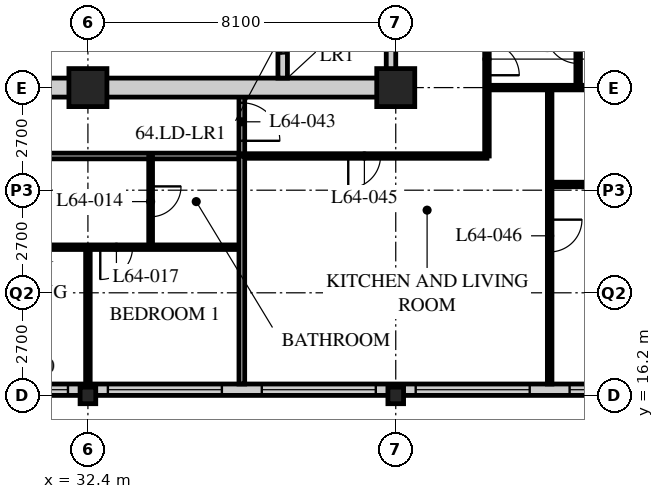
"""IFC4 building model, lengths in metres.
Left out: names, types, materials, properties, quantities, classifications, styles, units other than length and angle.
Written with IfcOpenShell. Run it as: python <this file> out.ifc"""

import sys

from ifc_helpers import new_model, si_unit, direction, frame, frame_2d, origin, origin_2d, place, context, subcontext, project, spatial, rectangle, hollow_rectangle, i_section, extrude, element, fill, save


model = new_model("IFC4")
c1 = context("Model", 3, precision=1e-05, world=origin(), true_north=direction((0.0, 1.0)))
c2 = subcontext(c1, "Body", "Model", "MODEL_VIEW")
j1 = project(units=[si_unit("LENGTHUNIT", "METRE"), si_unit("PLANEANGLEUNIT", "RADIAN")], contexts=[c1])
p1 = place(None, origin())
s1 = spatial("IfcSite", under=j1, at=p1, CompositionType="ELEMENT")
p2 = place(p1, origin())
s2 = spatial("IfcBuilding", under=s1, at=p2, CompositionType="ELEMENT")
p3 = place(p2, frame((0.0, 0.0, 250.2)))
s3 = spatial("IfcBuildingStorey", under=s2, at=p3, CompositionType="ELEMENT", Elevation=250.2)
p4 = place(p3, frame((32.4, 16.2, 0.0), z_axis=(0.0, 0.0, 1.0), x_axis=(1.0, 0.0, 0.0)))
e1 = element("IfcColumn", 1, at=p4, inside=s3, PredefinedType="COLUMN", context=c2, shape_type="SweptSolid", body=[
    extrude(i_section(OverallWidth=0.412, OverallDepth=0.437, WebThickness=0.036, FlangeThickness=0.058, FilletRadius=0.015, at=origin_2d()), origin(), (0.0, 0.0, 1.0), 3.9),
])
p5 = place(p3, frame((32.4, 24.3, 0.0), z_axis=(0.0, 0.0, 1.0), x_axis=(1.0, 0.0, 0.0)))
e2 = element("IfcColumn", 2, at=p5, inside=s3, PredefinedType="COLUMN", context=c2, shape_type="SweptSolid", body=[
    extrude(hollow_rectangle(XDim=1.0, YDim=1.0, WallThickness=0.1, at=origin_2d()), origin(), (0.0, 0.0, 1.0), 3.9),
])
p6 = place(p3, frame((40.5, 16.2, 0.0), z_axis=(0.0, 0.0, 1.0), x_axis=(1.0, 0.0, 0.0)))
e3 = element("IfcColumn", 3, at=p6, inside=s3, PredefinedType="COLUMN", context=c2, shape_type="SweptSolid", body=[
    extrude(i_section(OverallWidth=0.412, OverallDepth=0.437, WebThickness=0.036, FlangeThickness=0.058, FilletRadius=0.015, at=origin_2d()), origin(), (0.0, 0.0, 1.0), 3.9),
])
p7 = place(p3, frame((40.5, 24.3, 0.0), z_axis=(0.0, 0.0, 1.0), x_axis=(1.0, 0.0, 0.0)))
e4 = element("IfcColumn", 4, at=p7, inside=s3, PredefinedType="COLUMN", context=c2, shape_type="SweptSolid", body=[
    extrude(hollow_rectangle(XDim=1.0, YDim=1.0, WallThickness=0.1, at=origin_2d()), origin(), (0.0, 0.0, 1.0), 3.9),
])
p8 = place(p3, frame((8.4, 16.35, 0.0), z_axis=(0.0, 0.0, 1.0), x_axis=(1.0, 0.0, 0.0)))
e5 = element("IfcWall", 5, at=p8, inside=s3, PredefinedType="SOLIDWALL", context=c2, shape_type="SweptSolid", body=[
    extrude(rectangle(XDim=40.2, YDim=0.3, at=frame_2d((20.1, 0.0))), origin(), (0.0, 0.0, 1.0), 3.69),
])
p9 = place(p8, frame((0.225, 0.0, 0.6)))
e6 = element("IfcOpeningElement", 6, at=p9, cuts=e5, PredefinedType="OPENING", context=c2, shape_type="SweptSolid", body=[
    extrude(rectangle(XDim=3.0, YDim=2.4, at=frame_2d((1.5, 1.2))), frame((0.0, 0.16, 0.0), z_axis=(0.0, -1.0, 0.0), x_axis=(1.0, 0.0, 0.0)), (0.0, 0.0, 1.0), 0.32),
])
p10 = place(p8, frame((4.275, 0.0, 0.6)))
e7 = element("IfcOpeningElement", 7, at=p10, cuts=e5, PredefinedType="OPENING", context=c2, shape_type="SweptSolid", body=[
    extrude(rectangle(XDim=3.0, YDim=2.4, at=frame_2d((1.5, 1.2))), frame((0.0, 0.16, 0.0), z_axis=(0.0, -1.0, 0.0), x_axis=(1.0, 0.0, 0.0)), (0.0, 0.0, 1.0), 0.32),
])
p11 = place(p8, frame((8.325, 0.0, 0.6)))
e8 = element("IfcOpeningElement", 8, at=p11, cuts=e5, PredefinedType="OPENING", context=c2, shape_type="SweptSolid", body=[
    extrude(rectangle(XDim=3.0, YDim=2.4, at=frame_2d((1.5, 1.2))), frame((0.0, 0.16, 0.0), z_axis=(0.0, -1.0, 0.0), x_axis=(1.0, 0.0, 0.0)), (0.0, 0.0, 1.0), 0.32),
])
p12 = place(p8, frame((12.375, 0.0, 0.6)))
e9 = element("IfcOpeningElement", 9, at=p12, cuts=e5, PredefinedType="OPENING", context=c2, shape_type="SweptSolid", body=[
    extrude(rectangle(XDim=3.0, YDim=2.4, at=frame_2d((1.5, 1.2))), frame((0.0, 0.16, 0.0), z_axis=(0.0, -1.0, 0.0), x_axis=(1.0, 0.0, 0.0)), (0.0, 0.0, 1.0), 0.32),
])
p13 = place(p8, frame((16.425, 0.0, 0.6)))
e10 = element("IfcOpeningElement", 10, at=p13, cuts=e5, PredefinedType="OPENING", context=c2, shape_type="SweptSolid", body=[
    extrude(rectangle(XDim=3.0, YDim=2.4, at=frame_2d((1.5, 1.2))), frame((0.0, 0.16, 0.0), z_axis=(0.0, -1.0, 0.0), x_axis=(1.0, 0.0, 0.0)), (0.0, 0.0, 1.0), 0.32),
])
p14 = place(p8, frame((20.475, 0.0, 0.6)))
e11 = element("IfcOpeningElement", 11, at=p14, cuts=e5, PredefinedType="OPENING", context=c2, shape_type="SweptSolid", body=[
    extrude(rectangle(XDim=3.0, YDim=2.4, at=frame_2d((1.5, 1.2))), frame((0.0, 0.16, 0.0), z_axis=(0.0, -1.0, 0.0), x_axis=(1.0, 0.0, 0.0)), (0.0, 0.0, 1.0), 0.32),
])
p15 = place(p8, frame((24.525, 0.0, 0.6)))
e12 = element("IfcOpeningElement", 12, at=p15, cuts=e5, PredefinedType="OPENING", context=c2, shape_type="SweptSolid", body=[
    extrude(rectangle(XDim=3.0, YDim=2.4, at=frame_2d((1.5, 1.2))), frame((0.0, 0.16, 0.0), z_axis=(0.0, -1.0, 0.0), x_axis=(1.0, 0.0, 0.0)), (0.0, 0.0, 1.0), 0.32),
])
p16 = place(p8, frame((28.575, 0.0, 0.6)))
e13 = element("IfcOpeningElement", 13, at=p16, cuts=e5, PredefinedType="OPENING", context=c2, shape_type="SweptSolid", body=[
    extrude(rectangle(XDim=3.0, YDim=2.4, at=frame_2d((1.5, 1.2))), frame((0.0, 0.16, 0.0), z_axis=(0.0, -1.0, 0.0), x_axis=(1.0, 0.0, 0.0)), (0.0, 0.0, 1.0), 0.32),
])
p17 = place(p8, frame((32.625, 0.0, 0.6)))
e14 = element("IfcOpeningElement", 14, at=p17, cuts=e5, PredefinedType="OPENING", context=c2, shape_type="SweptSolid", body=[
    extrude(rectangle(XDim=3.0, YDim=2.4, at=frame_2d((1.5, 1.2))), frame((0.0, 0.16, 0.0), z_axis=(0.0, -1.0, 0.0), x_axis=(1.0, 0.0, 0.0)), (0.0, 0.0, 1.0), 0.32),
])
p18 = place(p8, frame((36.675, 0.0, 0.6)))
e15 = element("IfcOpeningElement", 15, at=p18, cuts=e5, PredefinedType="OPENING", context=c2, shape_type="SweptSolid", body=[
    extrude(rectangle(XDim=3.0, YDim=2.4, at=frame_2d((1.5, 1.2))), frame((0.0, 0.16, 0.0), z_axis=(0.0, -1.0, 0.0), x_axis=(1.0, 0.0, 0.0)), (0.0, 0.0, 1.0), 0.32),
])
p19 = place(p3, frame((12.15, 22.5, 0.0), z_axis=(0.0, 0.0, 1.0), x_axis=(1.0, 0.0, 0.0)))
e16 = element("IfcWall", 16, at=p19, inside=s3, PredefinedType="PARTITIONING", context=c2, shape_type="SweptSolid", body=[
    extrude(rectangle(XDim=24.3, YDim=0.15, at=frame_2d((12.15, 0.0))), origin(), (0.0, 0.0, 1.0), 3.69),
])
p20 = place(p19, frame((6.4, 0.0, 0.0)))
e17 = element("IfcOpeningElement", 17, at=p20, cuts=e16, PredefinedType="OPENING", context=c2, shape_type="SweptSolid", body=[
    extrude(rectangle(XDim=1.0, YDim=2.1, at=frame_2d((0.5, 1.05))), frame((0.0, 0.085, 0.0), z_axis=(0.0, -1.0, 0.0), x_axis=(1.0, 0.0, 0.0)), (0.0, 0.0, 1.0), 0.17),
])
p21 = place(p19, frame((8.5, 0.0, 0.0)))
e18 = element("IfcOpeningElement", 18, at=p21, cuts=e16, PredefinedType="OPENING", context=c2, shape_type="SweptSolid", body=[
    extrude(rectangle(XDim=1.0, YDim=2.1, at=frame_2d((0.5, 1.05))), frame((0.0, 0.085, 0.0), z_axis=(0.0, -1.0, 0.0), x_axis=(1.0, 0.0, 0.0)), (0.0, 0.0, 1.0), 0.17),
])
p22 = place(p19, frame((16.6, 0.0, 0.0)))
e19 = element("IfcOpeningElement", 19, at=p22, cuts=e16, PredefinedType="OPENING", context=c2, shape_type="SweptSolid", body=[
    extrude(rectangle(XDim=1.0, YDim=2.1, at=frame_2d((0.5, 1.05))), frame((0.0, 0.085, 0.0), z_axis=(0.0, -1.0, 0.0), x_axis=(1.0, 0.0, 0.0)), (0.0, 0.0, 1.0), 0.17),
])
p23 = place(p19, frame((2.625, 0.0, 0.0)))
e20 = element("IfcOpeningElement", 20, at=p23, cuts=e16, PredefinedType="OPENING", context=c2, shape_type="SweptSolid", body=[
    extrude(rectangle(XDim=1.0, YDim=2.1, at=frame_2d((0.5, 1.05))), frame((0.0, 0.085, 0.0), z_axis=(0.0, -1.0, 0.0), x_axis=(1.0, 0.0, 0.0)), (0.0, 0.0, 1.0), 0.17),
])
p24 = place(p3, frame((36.45, 22.5, 0.0), z_axis=(0.0, 0.0, 1.0), x_axis=(0.0, 1.0, 0.0)))
e21 = element("IfcWall", 21, at=p24, inside=s3, PredefinedType="PARTITIONING", context=c2, shape_type="SweptSolid", body=[
    extrude(rectangle(XDim=1.8, YDim=0.15, at=frame_2d((0.9, 0.0))), origin(), (0.0, 0.0, 1.0), 3.69),
])
p25 = place(p24, frame((0.4, 0.0, 0.0)))
e22 = element("IfcOpeningElement", 22, at=p25, cuts=e21, PredefinedType="OPENING", context=c2, shape_type="SweptSolid", body=[
    extrude(rectangle(XDim=1.0, YDim=2.1, at=frame_2d((0.5, 1.05))), frame((0.0, 0.085, 0.0), z_axis=(0.0, -1.0, 0.0), x_axis=(1.0, 0.0, 0.0)), (0.0, 0.0, 1.0), 0.17),
])
p26 = place(p3, frame((20.25, 20.1, 0.0), z_axis=(0.0, 0.0, 1.0), x_axis=(1.0, 0.0, 0.0)))
e23 = element("IfcWall", 23, at=p26, inside=s3, PredefinedType="PARTITIONING", context=c2, shape_type="SweptSolid", body=[
    extrude(rectangle(XDim=16.2, YDim=0.12, at=frame_2d((8.1, 0.0))), origin(), (0.0, 0.0, 1.0), 3.69),
])
p27 = place(p26, frame((0.975, 0.0, 0.0)))
e24 = element("IfcOpeningElement", 24, at=p27, cuts=e23, PredefinedType="OPENING", context=c2, shape_type="SweptSolid", body=[
    extrude(rectangle(XDim=0.85, YDim=2.1, at=frame_2d((0.425, 1.05))), frame((0.0, 0.07, 0.0), z_axis=(0.0, -1.0, 0.0), x_axis=(1.0, 0.0, 0.0)), (0.0, 0.0, 1.0), 0.14),
])
p28 = place(p26, frame((4.375, 0.0, 0.0)))
e25 = element("IfcOpeningElement", 25, at=p28, cuts=e23, PredefinedType="OPENING", context=c2, shape_type="SweptSolid", body=[
    extrude(rectangle(XDim=0.85, YDim=2.1, at=frame_2d((0.425, 1.05))), frame((0.0, 0.07, 0.0), z_axis=(0.0, -1.0, 0.0), x_axis=(1.0, 0.0, 0.0)), (0.0, 0.0, 1.0), 0.14),
])
p29 = place(p26, frame((9.075, 0.0, 0.0)))
e26 = element("IfcOpeningElement", 26, at=p29, cuts=e23, PredefinedType="OPENING", context=c2, shape_type="SweptSolid", body=[
    extrude(rectangle(XDim=0.85, YDim=2.1, at=frame_2d((0.425, 1.05))), frame((0.0, 0.07, 0.0), z_axis=(0.0, -1.0, 0.0), x_axis=(1.0, 0.0, 0.0)), (0.0, 0.0, 1.0), 0.14),
])
p30 = place(p26, frame((12.475, 0.0, 0.0)))
e27 = element("IfcOpeningElement", 27, at=p30, cuts=e23, PredefinedType="OPENING", context=c2, shape_type="SweptSolid", body=[
    extrude(rectangle(XDim=0.85, YDim=2.1, at=frame_2d((0.425, 1.05))), frame((0.0, 0.07, 0.0), z_axis=(0.0, -1.0, 0.0), x_axis=(1.0, 0.0, 0.0)), (0.0, 0.0, 1.0), 0.14),
])
p31 = place(p3, frame((34.05, 22.5, 0.0), z_axis=(0.0, 0.0, 1.0), x_axis=(0.0, -1.0, 0.0)))
e28 = element("IfcWall", 28, at=p31, inside=s3, PredefinedType="PARTITIONING", context=c2, shape_type="SweptSolid", body=[
    extrude(rectangle(XDim=2.4, YDim=0.1, at=frame_2d((1.2, 0.0))), origin(), (0.0, 0.0, 1.0), 3.69),
])
p32 = place(p31, frame((0.8, 0.0, 0.0)))
e29 = element("IfcOpeningElement", 29, at=p32, cuts=e28, PredefinedType="OPENING", context=c2, shape_type="SweptSolid", body=[
    extrude(rectangle(XDim=0.8, YDim=2.1, at=frame_2d((0.4, 1.05))), frame((0.0, 0.06, 0.0), z_axis=(0.0, -1.0, 0.0), x_axis=(1.0, 0.0, 0.0)), (0.0, 0.0, 1.0), 0.12),
])
p33 = place(p3, frame((32.4, 20.1, 0.0), z_axis=(0.0, 0.0, 1.0), x_axis=(0.0, -1.0, 0.0)))
e30 = element("IfcWall", 30, at=p33, inside=s3, PredefinedType="PARTITIONING", context=c2, shape_type="SweptSolid", body=[
    extrude(rectangle(XDim=3.6, YDim=0.12, at=frame_2d((1.8, 0.0))), origin(), (0.0, 0.0, 1.0), 3.078),
])
p34 = place(p3, frame((42.9, 22.5, 0.0), z_axis=(0.0, 0.0, 1.0), x_axis=(0.0, 1.0, 0.0)))
e31 = element("IfcWall", 31, at=p34, inside=s3, PredefinedType="PARTITIONING", context=c2, shape_type="SweptSolid", body=[
    extrude(rectangle(XDim=13.95, YDim=0.12, at=frame_2d((6.975, 0.0))), origin(), (0.0, 0.0, 1.0), 3.69),
])
p35 = place(p34, frame((2.125, 0.0, 0.0)))
e32 = element("IfcOpeningElement", 32, at=p35, cuts=e31, PredefinedType="OPENING", context=c2, shape_type="SweptSolid", body=[
    extrude(rectangle(XDim=0.85, YDim=2.1, at=frame_2d((0.425, 1.05))), frame((0.0, 0.07, 0.0), z_axis=(0.0, -1.0, 0.0), x_axis=(1.0, 0.0, 0.0)), (0.0, 0.0, 1.0), 0.14),
])
p36 = place(p34, frame((6.175, 0.0, 0.0)))
e33 = element("IfcOpeningElement", 33, at=p36, cuts=e31, PredefinedType="OPENING", context=c2, shape_type="SweptSolid", body=[
    extrude(rectangle(XDim=0.85, YDim=2.1, at=frame_2d((0.425, 1.05))), frame((0.0, 0.07, 0.0), z_axis=(0.0, -1.0, 0.0), x_axis=(1.0, 0.0, 0.0)), (0.0, 0.0, 1.0), 0.14),
])
p37 = place(p34, frame((10.225, 0.0, 0.0)))
e34 = element("IfcOpeningElement", 34, at=p37, cuts=e31, PredefinedType="OPENING", context=c2, shape_type="SweptSolid", body=[
    extrude(rectangle(XDim=0.85, YDim=2.1, at=frame_2d((0.425, 1.05))), frame((0.0, 0.07, 0.0), z_axis=(0.0, -1.0, 0.0), x_axis=(1.0, 0.0, 0.0)), (0.0, 0.0, 1.0), 0.14),
])
p38 = place(p3, frame((36.45, 22.5, 0.0), z_axis=(0.0, 0.0, 1.0), x_axis=(1.0, 0.0, 0.0)))
e35 = element("IfcWall", 35, at=p38, inside=s3, PredefinedType="PARTITIONING", context=c2, shape_type="SweptSolid", body=[
    extrude(rectangle(XDim=6.45, YDim=0.12, at=frame_2d((3.225, 0.0))), origin(), (0.0, 0.0, 1.0), 3.69),
])
p39 = place(p38, frame((2.8, 0.0, 0.0)))
e36 = element("IfcOpeningElement", 36, at=p39, cuts=e35, PredefinedType="OPENING", context=c2, shape_type="SweptSolid", body=[
    extrude(rectangle(XDim=0.85, YDim=2.1, at=frame_2d((0.425, 1.05))), frame((0.0, 0.07, 0.0), z_axis=(0.0, -1.0, 0.0), x_axis=(1.0, 0.0, 0.0)), (0.0, 0.0, 1.0), 0.14),
])
p40 = place(p3, frame((42.9, 24.3, 0.0), z_axis=(0.0, 0.0, 1.0), x_axis=(1.0, 0.0, 0.0)))
e37 = element("IfcWall", 37, at=p40, inside=s3, PredefinedType="PARTITIONING", context=c2, shape_type="SweptSolid", body=[
    extrude(rectangle(XDim=9.45, YDim=0.12, at=frame_2d((4.725, 0.0))), origin(), (0.0, 0.0, 1.0), 3.078),
])
p41 = place(p3, frame((36.45, 16.5, 0.0), z_axis=(0.0, 0.0, 1.0), x_axis=(0.0, 1.0, 0.0)))
e38 = element("IfcWall", 38, at=p41, inside=s3, PredefinedType="PARTITIONING", context=c2, shape_type="SweptSolid", body=[
    extrude(rectangle(XDim=6.0, YDim=0.15, at=frame_2d((3.0, 0.0))), origin(), (0.0, 0.0, 1.0), 3.69),
])
p42 = place(p3, frame((44.55, 16.5, 0.0), z_axis=(0.0, 0.0, 1.0), x_axis=(0.0, 1.0, 0.0)))
e39 = element("IfcWall", 39, at=p42, inside=s3, PredefinedType="PARTITIONING", context=c2, shape_type="SweptSolid", body=[
    extrude(rectangle(XDim=7.8, YDim=0.12, at=frame_2d((3.9, 0.0))), origin(), (0.0, 0.0, 1.0), 3.69),
])
p43 = place(p42, frame((3.475, 0.0, 0.0)))
e40 = element("IfcOpeningElement", 40, at=p43, cuts=e39, PredefinedType="OPENING", context=c2, shape_type="SweptSolid", body=[
    extrude(rectangle(XDim=0.85, YDim=2.1, at=frame_2d((0.425, 1.05))), frame((0.0, 0.07, 0.0), z_axis=(0.0, -1.0, 0.0), x_axis=(1.0, 0.0, 0.0)), (0.0, 0.0, 1.0), 0.14),
])
p44 = place(p3, frame((45.3, 24.3, 0.0), z_axis=(0.0, 0.0, 1.0), x_axis=(0.0, 1.0, 0.0)))
e41 = element("IfcWall", 41, at=p44, inside=s3, PredefinedType="PARTITIONING", context=c2, shape_type="SweptSolid", body=[
    extrude(rectangle(XDim=1.76, YDim=0.12, at=frame_2d((0.88, 0.0))), origin(), (0.0, 0.0, 1.0), 3.69),
])
p45 = place(p44, frame((0.635, 0.0, 0.0)))
e42 = element("IfcOpeningElement", 42, at=p45, cuts=e41, PredefinedType="OPENING", context=c2, shape_type="SweptSolid", body=[
    extrude(rectangle(XDim=0.85, YDim=2.1, at=frame_2d((0.425, 1.05))), frame((0.0, 0.07, 0.0), z_axis=(0.0, -1.0, 0.0), x_axis=(1.0, 0.0, 0.0)), (0.0, 0.0, 1.0), 0.14),
])
p46 = place(p3, frame((44.55, 21.75, 0.0), z_axis=(0.0, 0.0, 1.0), x_axis=(1.0, 0.0, 0.0)))
e43 = element("IfcWall", 43, at=p46, inside=s3, PredefinedType="PARTITIONING", context=c2, shape_type="SweptSolid", body=[
    extrude(rectangle(XDim=7.8, YDim=0.12, at=frame_2d((3.9, 0.0))), origin(), (0.0, 0.0, 1.0), 3.69),
])
p47 = place(p46, frame((3.475, 0.0, 0.0)))
e44 = element("IfcOpeningElement", 44, at=p47, cuts=e43, PredefinedType="OPENING", context=c2, shape_type="SweptSolid", body=[
    extrude(rectangle(XDim=0.85, YDim=2.1, at=frame_2d((0.425, 1.05))), frame((0.0, 0.07, 0.0), z_axis=(0.0, -1.0, 0.0), x_axis=(1.0, 0.0, 0.0)), (0.0, 0.0, 1.0), 0.14),
])
p48 = place(p3, frame((15.95, 24.3, 0.0), z_axis=(0.0, 0.0, 1.0), x_axis=(1.0, 0.0, 0.0)))
e45 = element("IfcWall", 45, at=p48, inside=s3, PredefinedType="SOLIDWALL", context=c2, shape_type="SweptSolid", body=[
    extrude(rectangle(XDim=24.55, YDim=0.5, at=frame_2d((12.275, 0.0))), origin(), (0.0, 0.0, 1.0), 3.04),
])
p49 = place(p48, frame((11.5, 0.0, 0.0)))
e46 = element("IfcOpeningElement", 46, at=p49, cuts=e45, PredefinedType="OPENING", context=c2, shape_type="SweptSolid", body=[
    extrude(rectangle(XDim=1.8, YDim=2.4, at=frame_2d((0.9, 1.2))), frame((0.0, 0.26, 0.0), z_axis=(0.0, -1.0, 0.0), x_axis=(1.0, 0.0, 0.0)), (0.0, 0.0, 1.0), 0.52),
])
p50 = place(p3, frame((40.375, 24.55, 0.0), z_axis=(0.0, 0.0, 1.0), x_axis=(0.0, 1.0, 0.0)))
e47 = element("IfcWall", 47, at=p50, inside=s3, PredefinedType="SOLIDWALL", context=c2, shape_type="SweptSolid", body=[
    extrude(rectangle(XDim=15.7, YDim=0.25, at=frame_2d((7.85, 0.0))), origin(), (0.0, 0.0, 1.0), 3.078),
])
p51 = place(p3, frame((37.525, 24.55, 0.0), z_axis=(0.0, 0.0, 1.0), x_axis=(0.0, 1.0, 0.0)))
e48 = element("IfcWall", 48, at=p51, inside=s3, PredefinedType="SOLIDWALL", context=c2, shape_type="SweptSolid", body=[
    extrude(rectangle(XDim=7.75, YDim=0.25, at=frame_2d((3.875, 0.0))), origin(), (0.0, 0.0, 1.0), 3.69),
])
p52 = place(p51, frame((0.65, 0.0, 0.0)))
e49 = element("IfcOpeningElement", 49, at=p52, cuts=e48, PredefinedType="OPENING", context=c2, shape_type="SweptSolid", body=[
    extrude(rectangle(XDim=1.1, YDim=2.4, at=frame_2d((0.55, 1.2))), frame((0.0, 0.135, 0.0), z_axis=(0.0, -1.0, 0.0), x_axis=(1.0, 0.0, 0.0)), (0.0, 0.0, 1.0), 0.27),
])
p53 = place(p51, frame((3.25, 0.0, 0.0)))
e50 = element("IfcOpeningElement", 50, at=p53, cuts=e48, PredefinedType="OPENING", context=c2, shape_type="SweptSolid", body=[
    extrude(rectangle(XDim=1.1, YDim=2.4, at=frame_2d((0.55, 1.2))), frame((0.0, 0.135, 0.0), z_axis=(0.0, -1.0, 0.0), x_axis=(1.0, 0.0, 0.0)), (0.0, 0.0, 1.0), 0.27),
])
p54 = place(p51, frame((5.85, 0.0, 0.0)))
e51 = element("IfcOpeningElement", 51, at=p54, cuts=e48, PredefinedType="OPENING", context=c2, shape_type="SweptSolid", body=[
    extrude(rectangle(XDim=1.1, YDim=2.4, at=frame_2d((0.55, 1.2))), frame((0.0, 0.135, 0.0), z_axis=(0.0, -1.0, 0.0), x_axis=(1.0, 0.0, 0.0)), (0.0, 0.0, 1.0), 0.27),
])
p55 = place(p14, origin())
e52 = element("IfcWindow", 52, at=p55, inside=s3, PartitioningType="SINGLE_PANEL", PredefinedType="WINDOW", context=c2, shape_type="SweptSolid", body=[
    extrude(rectangle(XDim=3.0, YDim=2.4, at=frame_2d((1.5, 1.2))), frame((0.0, 0.03, 0.0), z_axis=(0.0, -1.0, 0.0), x_axis=(1.0, 0.0, 0.0)), (0.0, 0.0, 1.0), 0.06),
])
fill(e11, e52)
p56 = place(p15, origin())
e53 = element("IfcWindow", 53, at=p56, inside=s3, PartitioningType="SINGLE_PANEL", PredefinedType="WINDOW", context=c2, shape_type="SweptSolid", body=[
    extrude(rectangle(XDim=3.0, YDim=2.4, at=frame_2d((1.5, 1.2))), frame((0.0, 0.03, 0.0), z_axis=(0.0, -1.0, 0.0), x_axis=(1.0, 0.0, 0.0)), (0.0, 0.0, 1.0), 0.06),
])
fill(e12, e53)
p57 = place(p16, origin())
e54 = element("IfcWindow", 54, at=p57, inside=s3, PartitioningType="SINGLE_PANEL", PredefinedType="WINDOW", context=c2, shape_type="SweptSolid", body=[
    extrude(rectangle(XDim=3.0, YDim=2.4, at=frame_2d((1.5, 1.2))), frame((0.0, 0.03, 0.0), z_axis=(0.0, -1.0, 0.0), x_axis=(1.0, 0.0, 0.0)), (0.0, 0.0, 1.0), 0.06),
])
fill(e13, e54)
p58 = place(p17, origin())
e55 = element("IfcWindow", 55, at=p58, inside=s3, PartitioningType="SINGLE_PANEL", PredefinedType="WINDOW", context=c2, shape_type="SweptSolid", body=[
    extrude(rectangle(XDim=3.0, YDim=2.4, at=frame_2d((1.5, 1.2))), frame((0.0, 0.03, 0.0), z_axis=(0.0, -1.0, 0.0), x_axis=(1.0, 0.0, 0.0)), (0.0, 0.0, 1.0), 0.06),
])
fill(e14, e55)
p59 = place(p18, origin())
e56 = element("IfcWindow", 56, at=p59, inside=s3, PartitioningType="SINGLE_PANEL", PredefinedType="WINDOW", context=c2, shape_type="SweptSolid", body=[
    extrude(rectangle(XDim=3.0, YDim=2.4, at=frame_2d((1.5, 1.2))), frame((0.0, 0.03, 0.0), z_axis=(0.0, -1.0, 0.0), x_axis=(1.0, 0.0, 0.0)), (0.0, 0.0, 1.0), 0.06),
])
fill(e15, e56)
p60 = place(p32, origin())
e57 = element("IfcDoor", 57, at=p60, inside=s3, OperationType="SINGLE_SWING_LEFT", PredefinedType="DOOR", context=c2, shape_type="SweptSolid", body=[
    extrude(rectangle(XDim=0.8, YDim=2.1, at=frame_2d((0.4, 1.05))), frame((0.0, 0.025, 0.0), z_axis=(0.0, -1.0, 0.0), x_axis=(1.0, 0.0, 0.0)), (0.0, 0.0, 1.0), 0.05),
])
fill(e29, e57)
p61 = place(p30, origin())
e58 = element("IfcDoor", 58, at=p61, inside=s3, OperationType="SINGLE_SWING_RIGHT", PredefinedType="DOOR", context=c2, shape_type="SweptSolid", body=[
    extrude(rectangle(XDim=0.85, YDim=2.1, at=frame_2d((0.425, 1.05))), frame((0.0, 0.025, 0.0), z_axis=(0.0, -1.0, 0.0), x_axis=(1.0, 0.0, 0.0)), (0.0, 0.0, 1.0), 0.05),
])
fill(e27, e58)
p62 = place(p25, origin())
e59 = element("IfcDoor", 59, at=p62, inside=s3, OperationType="SINGLE_SWING_RIGHT", PredefinedType="DOOR", context=c2, shape_type="SweptSolid", body=[
    extrude(rectangle(XDim=1.0, YDim=2.1, at=frame_2d((0.5, 1.05))), frame((0.0, 0.025, 0.0), z_axis=(0.0, -1.0, 0.0), x_axis=(1.0, 0.0, 0.0)), (0.0, 0.0, 1.0), 0.05),
])
fill(e22, e59)
p63 = place(p39, origin())
e60 = element("IfcDoor", 60, at=p63, inside=s3, OperationType="SINGLE_SWING_RIGHT", PredefinedType="DOOR", context=c2, shape_type="SweptSolid", body=[
    extrude(rectangle(XDim=0.85, YDim=2.1, at=frame_2d((0.425, 1.05))), frame((0.0, 0.025, 0.0), z_axis=(0.0, -1.0, 0.0), x_axis=(1.0, 0.0, 0.0)), (0.0, 0.0, 1.0), 0.05),
])
fill(e36, e60)
p64 = place(p43, origin())
e61 = element("IfcDoor", 61, at=p64, inside=s3, OperationType="SINGLE_SWING_LEFT", PredefinedType="DOOR", context=c2, shape_type="SweptSolid", body=[
    extrude(rectangle(XDim=0.85, YDim=2.1, at=frame_2d((0.425, 1.05))), frame((0.0, 0.025, 0.0), z_axis=(0.0, -1.0, 0.0), x_axis=(1.0, 0.0, 0.0)), (0.0, 0.0, 1.0), 0.05),
])
fill(e40, e61)
p65 = place(p35, origin())
e62 = element("IfcDoor", 62, at=p65, inside=s3, OperationType="SINGLE_SWING_RIGHT", PredefinedType="DOOR", context=c2, shape_type="SweptSolid", body=[
    extrude(rectangle(XDim=0.85, YDim=2.1, at=frame_2d((0.425, 1.05))), frame((0.0, 0.025, 0.0), z_axis=(0.0, -1.0, 0.0), x_axis=(1.0, 0.0, 0.0)), (0.0, 0.0, 1.0), 0.05),
])
fill(e32, e62)
p66 = place(p45, origin())
e63 = element("IfcDoor", 63, at=p66, inside=s3, OperationType="SINGLE_SWING_RIGHT", PredefinedType="DOOR", context=c2, shape_type="SweptSolid", body=[
    extrude(rectangle(XDim=0.85, YDim=2.1, at=frame_2d((0.425, 1.05))), frame((0.0, 0.025, 0.0), z_axis=(0.0, -1.0, 0.0), x_axis=(1.0, 0.0, 0.0)), (0.0, 0.0, 1.0), 0.05),
])
fill(e42, e63)
p67 = place(p52, origin())
e64 = element("IfcDoor", 64, at=p67, inside=s3, OperationType="DOUBLE_DOOR_SLIDING", PredefinedType="DOOR", context=c2, shape_type="SweptSolid", body=[
    extrude(rectangle(XDim=1.1, YDim=2.4, at=frame_2d((0.55, 1.2))), frame((0.0, 0.025, 0.0), z_axis=(0.0, -1.0, 0.0), x_axis=(1.0, 0.0, 0.0)), (0.0, 0.0, 1.0), 0.05),
])
fill(e49, e64)
save(model, sys.argv[1])
